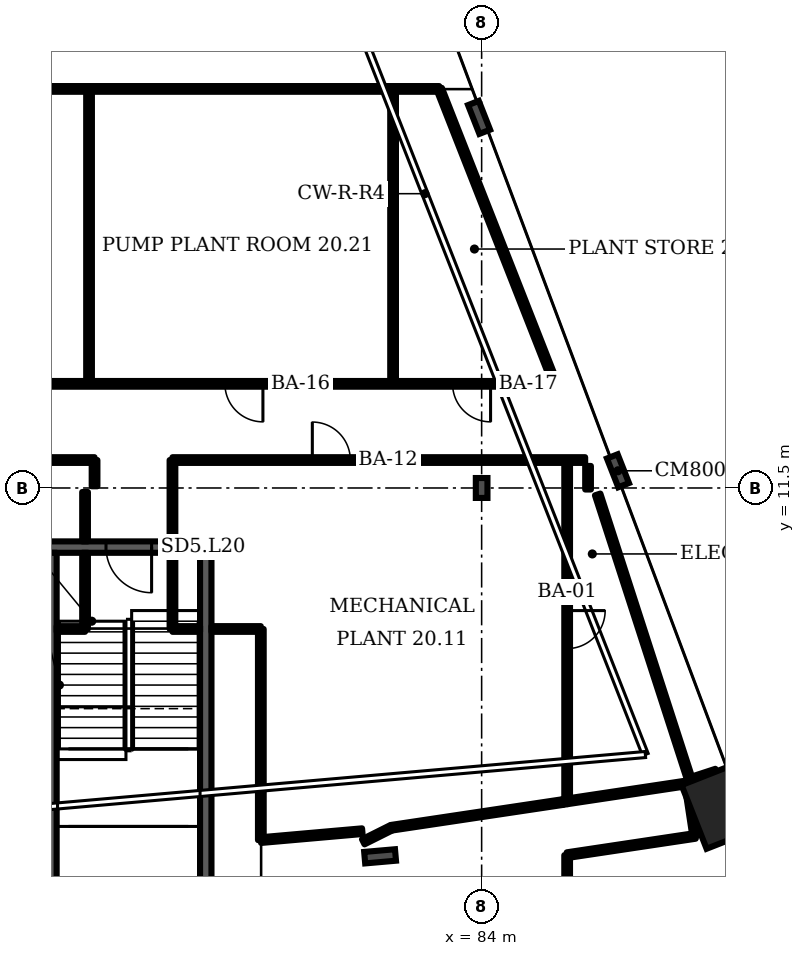
"""IFC4 building model, lengths in metres.
Left out: names, types, materials, properties, quantities, classifications, styles, units other than length and angle.
Written with IfcOpenShell. Run it as: python <this file> out.ifc"""

import sys

from ifc_helpers import new_model, si_unit, direction, frame, frame_2d, origin, origin_2d, place, context, subcontext, project, spatial, rectangle, i_section, extrude, element, fill, save


model = new_model("IFC4")
c1 = context("Model", 3, precision=1e-05, world=origin(), true_north=direction((0.0, 1.0)))
c2 = subcontext(c1, "Body", "Model", "MODEL_VIEW")
j1 = project(units=[si_unit("LENGTHUNIT", "METRE"), si_unit("PLANEANGLEUNIT", "RADIAN")], contexts=[c1])
p1 = place(None, origin())
s1 = spatial("IfcSite", under=j1, at=p1, CompositionType="ELEMENT")
p2 = place(p1, origin())
s2 = spatial("IfcBuilding", under=s1, at=p2, CompositionType="ELEMENT")
p3 = place(p2, frame((0.0, 0.0, 91.9)))
s3 = spatial("IfcBuildingStorey", under=s2, at=p3, CompositionType="ELEMENT", Elevation=91.9)
p4 = place(p3, frame((90.427, 3.174, 0.0), z_axis=(0.0, 0.0, 1.0), x_axis=(-0.365778, 0.930702, 0.0)))
e1 = element("IfcColumn", 1, at=p4, inside=s3, PredefinedType="COLUMN", context=c2, shape_type="SweptSolid", body=[
    extrude(rectangle(XDim=1.8, YDim=1.8, at=origin_2d()), origin(), (0.0, 0.0, 1.0), 4.8),
])
for number, where, z_axis, x_axis in (
    (2, (81.328, 1.808, 0.0), (0.0, 0.0, 1.0), (0.087, -0.996, 0.0)),
    (3, (87.587, 11.952, 0.0), (0.0, 0.0, 1.0), (0.931, 0.366, 0.0)),
    (4, (83.933, 21.251, 0.0), (0.0, 0.0, 1.0), (0.931, 0.366, 0.0)),
):
    element("IfcColumn", number, at=place(p3, frame(where, z_axis=z_axis, x_axis=x_axis)), inside=s3, PredefinedType="COLUMN", context=c2, shape_type="SweptSolid", body=[
        extrude(i_section(OverallWidth=0.303, OverallDepth=0.814, WebThickness=0.021, FlangeThickness=0.04, FilletRadius=0.03, at=origin_2d()), origin(), (0.0, 0.0, 1.0), 4.8),
    ])
p5 = place(p3, frame((84.0, 11.5, 0.0), z_axis=(0.0, 0.0, 1.0), x_axis=(1.0, 0.0, 0.0)))
e5 = element("IfcColumn", 5, at=p5, inside=s3, PredefinedType="COLUMN", context=c2, shape_type="SweptSolid", body=[
    extrude(i_section(OverallWidth=0.306, OverallDepth=0.524, WebThickness=0.021, FlangeThickness=0.04, FilletRadius=0.027, at=origin_2d()), origin(), (0.0, 0.0, 1.0), 4.8),
])
p6 = place(p3, frame((72.518, 9.945, 0.0), z_axis=(0.0, 0.0, 1.0), x_axis=(1.0, 0.0, 0.0)))
e6 = element("IfcWall", 6, at=p6, inside=s3, PredefinedType="SHEAR", context=c2, shape_type="SweptSolid", body=[
    extrude(rectangle(XDim=4.374, YDim=0.3, at=frame_2d((2.187, 0.0))), origin(), (0.0, 0.0, 1.0), 4.4),
])
p7 = place(p6, frame((1.598, 0.0, 0.0)))
e7 = element("IfcOpeningElement", 7, at=p7, cuts=e6, PredefinedType="OPENING", context=c2, shape_type="SweptSolid", body=[
    extrude(rectangle(XDim=1.2, YDim=2.1, at=frame_2d((0.6, 1.05))), frame((0.0, 0.16, 0.0), z_axis=(0.0, -1.0, 0.0), x_axis=(1.0, 0.0, 0.0)), (0.0, 0.0, 1.0), 0.32),
])
p8 = place(p3, frame((18.2, 14.24, 0.0), z_axis=(0.0, 0.0, 1.0), x_axis=(1.0, 0.0, 0.0)))
e8 = element("IfcWall", 8, at=p8, inside=s3, PredefinedType="PARTITIONING", context=c2, shape_type="SweptSolid", body=[
    extrude(rectangle(XDim=67.735, YDim=0.15, at=frame_2d((33.868, 0.0))), origin(), (0.0, 0.0, 1.0), 4.4),
])
p9 = place(p8, frame((11.98, 0.0, 0.0)))
e9 = element("IfcOpeningElement", 9, at=p9, cuts=e8, PredefinedType="OPENING", context=c2, shape_type="SweptSolid", body=[
    extrude(rectangle(XDim=1.0, YDim=2.1, at=frame_2d((0.5, 1.05))), frame((0.0, 0.085, 0.0), z_axis=(0.0, -1.0, 0.0), x_axis=(1.0, 0.0, 0.0)), (0.0, 0.0, 1.0), 0.17),
])
p10 = place(p8, frame((23.515, 0.0, 0.0)))
e10 = element("IfcOpeningElement", 10, at=p10, cuts=e8, PredefinedType="OPENING", context=c2, shape_type="SweptSolid", body=[
    extrude(rectangle(XDim=1.0, YDim=2.1, at=frame_2d((0.5, 1.05))), frame((0.0, 0.085, 0.0), z_axis=(0.0, -1.0, 0.0), x_axis=(1.0, 0.0, 0.0)), (0.0, 0.0, 1.0), 0.17),
])
p11 = place(p8, frame((59.045, 0.0, 0.0)))
e11 = element("IfcOpeningElement", 11, at=p11, cuts=e8, PredefinedType="OPENING", context=c2, shape_type="SweptSolid", body=[
    extrude(rectangle(XDim=1.0, YDim=2.1, at=frame_2d((0.5, 1.05))), frame((0.0, 0.085, 0.0), z_axis=(0.0, -1.0, 0.0), x_axis=(1.0, 0.0, 0.0)), (0.0, 0.0, 1.0), 0.17),
])
p12 = place(p8, frame((65.035, 0.0, 0.0)))
e12 = element("IfcOpeningElement", 12, at=p12, cuts=e8, PredefinedType="OPENING", context=c2, shape_type="SweptSolid", body=[
    extrude(rectangle(XDim=1.0, YDim=2.1, at=frame_2d((0.5, 1.05))), frame((0.0, 0.085, 0.0), z_axis=(0.0, -1.0, 0.0), x_axis=(1.0, 0.0, 0.0)), (0.0, 0.0, 1.0), 0.17),
])
p13 = place(p3, frame((44.51, 12.235, 0.0), z_axis=(0.0, 0.0, 1.0), x_axis=(1.0, 0.0, 0.0)))
e13 = element("IfcWall", 13, at=p13, inside=s3, PredefinedType="PARTITIONING", context=c2, shape_type="SweptSolid", body=[
    extrude(rectangle(XDim=29.305, YDim=0.15, at=frame_2d((14.652, 0.0))), origin(), (0.0, 0.0, 1.0), 4.4),
])
p14 = place(p13, frame((0.385, 0.0, 0.0)))
e14 = element("IfcOpeningElement", 14, at=p14, cuts=e13, PredefinedType="OPENING", context=c2, shape_type="SweptSolid", body=[
    extrude(rectangle(XDim=1.0, YDim=2.1, at=frame_2d((0.5, 1.05))), frame((0.0, 0.085, 0.0), z_axis=(0.0, -1.0, 0.0), x_axis=(1.0, 0.0, 0.0)), (0.0, 0.0, 1.0), 0.17),
])
p15 = place(p13, frame((9.513, 0.0, 0.0)))
e15 = element("IfcOpeningElement", 15, at=p15, cuts=e13, PredefinedType="OPENING", context=c2, shape_type="SweptSolid", body=[
    extrude(rectangle(XDim=1.0, YDim=2.1, at=frame_2d((0.5, 1.05))), frame((0.0, 0.085, 0.0), z_axis=(0.0, -1.0, 0.0), x_axis=(1.0, 0.0, 0.0)), (0.0, 0.0, 1.0), 0.17),
])
p16 = place(p13, frame((22.585, 0.0, 0.0)))
e16 = element("IfcOpeningElement", 16, at=p16, cuts=e13, PredefinedType="OPENING", context=c2, shape_type="SweptSolid", body=[
    extrude(rectangle(XDim=1.0, YDim=2.1, at=frame_2d((0.5, 1.05))), frame((0.0, 0.085, 0.0), z_axis=(0.0, -1.0, 0.0), x_axis=(1.0, 0.0, 0.0)), (0.0, 0.0, 1.0), 0.17),
])
p17 = place(p3, frame((72.125, 22.0, 0.0), z_axis=(0.0, 0.0, 1.0), x_axis=(1.0, 0.0, 0.0)))
e17 = element("IfcWall", 17, at=p17, inside=s3, PredefinedType="PARTITIONING", context=c2, shape_type="SweptSolid", body=[
    extrude(rectangle(XDim=10.76, YDim=0.15, at=frame_2d((5.38, 0.0))), origin(), (0.0, 0.0, 1.0), 4.4),
])
p18 = place(p3, frame((73.565, 7.79, 0.0), z_axis=(0.0, 0.0, 1.0), x_axis=(0.0, 1.0, 0.0)))
e18 = element("IfcWall", 18, at=p18, inside=s3, PredefinedType="PARTITIONING", context=c2, shape_type="SweptSolid", body=[
    extrude(rectangle(XDim=2.005, YDim=0.15, at=frame_2d((1.002, 0.0))), origin(), (0.0, 0.0, 1.0), 4.4),
])
p19 = place(p3, frame((73.67, 14.24, 0.0), z_axis=(0.0, 0.0, 1.0), x_axis=(0.0, 1.0, 0.0)))
e19 = element("IfcWall", 19, at=p19, inside=s3, PredefinedType="PARTITIONING", context=c2, shape_type="SweptSolid", body=[
    extrude(rectangle(XDim=7.76, YDim=0.15, at=frame_2d((3.88, 0.0))), origin(), (0.0, 0.0, 1.0), 4.4),
])
p20 = place(p3, frame((73.815, 11.545, 0.0), z_axis=(0.0, 0.0, 1.0), x_axis=(0.0, 1.0, 0.0)))
e20 = element("IfcWall", 20, at=p20, inside=s3, PredefinedType="PARTITIONING", context=c2, shape_type="SweptSolid", body=[
    extrude(rectangle(XDim=0.69, YDim=0.15, at=frame_2d((0.345, 0.0))), origin(), (0.0, 0.0, 1.0), 4.4),
])
p21 = place(p3, frame((75.865, 7.79, 0.0), z_axis=(0.0, 0.0, 1.0), x_axis=(0.0, 1.0, 0.0)))
e21 = element("IfcWall", 21, at=p21, inside=s3, PredefinedType="PARTITIONING", context=c2, shape_type="SweptSolid", body=[
    extrude(rectangle(XDim=2.005, YDim=0.15, at=frame_2d((1.002, 0.0))), origin(), (0.0, 0.0, 1.0), 4.4),
])
p22 = place(p3, frame((75.865, 7.79, 0.0), z_axis=(0.0, 0.0, 1.0), x_axis=(1.0, 0.0, 0.0)))
e22 = element("IfcWall", 22, at=p22, inside=s3, PredefinedType="PARTITIONING", context=c2, shape_type="SweptSolid", body=[
    extrude(rectangle(XDim=0.726, YDim=0.15, at=frame_2d((0.363, 0.0))), origin(), (0.0, 0.0, 1.0), 4.4),
])
p23 = place(p3, frame((75.865, 12.235, 0.0), z_axis=(0.0, 0.0, 1.0), x_axis=(1.0, 0.0, 0.0)))
e23 = element("IfcWall", 23, at=p23, inside=s3, PredefinedType="PARTITIONING", context=c2, shape_type="SweptSolid", body=[
    extrude(rectangle(XDim=10.859, YDim=0.15, at=frame_2d((5.429, 0.0))), origin(), (0.0, 0.0, 1.0), 4.4),
])
p24 = place(p23, frame((3.68, 0.0, 0.0)))
e24 = element("IfcOpeningElement", 24, at=p24, cuts=e23, PredefinedType="OPENING", context=c2, shape_type="SweptSolid", body=[
    extrude(rectangle(XDim=1.0, YDim=2.1, at=frame_2d((0.5, 1.05))), frame((0.0, 0.085, 0.0), z_axis=(0.0, -1.0, 0.0), x_axis=(1.0, 0.0, 0.0)), (0.0, 0.0, 1.0), 0.17),
])
p25 = place(p3, frame((78.19, 2.235, 0.0), z_axis=(0.0, 0.0, 1.0), x_axis=(0.996154, 0.08762, 0.0)))
e25 = element("IfcWall", 25, at=p25, inside=s3, PredefinedType="PARTITIONING", context=c2, shape_type="SweptSolid", body=[
    extrude(rectangle(XDim=2.68, YDim=0.15, at=frame_2d((1.34, 0.0))), origin(), (0.0, 0.0, 1.0), 4.4),
])
p26 = place(p3, frame((78.19, 2.235, 0.0), z_axis=(0.0, 0.0, 1.0), x_axis=(0.0, 1.0, 0.0)))
e26 = element("IfcWall", 26, at=p26, inside=s3, PredefinedType="PARTITIONING", context=c2, shape_type="SweptSolid", body=[
    extrude(rectangle(XDim=5.555, YDim=0.15, at=frame_2d((2.777, 0.0))), origin(), (0.0, 0.0, 1.0), 4.4),
])
p27 = place(p3, frame((80.885, 2.19, 0.0), z_axis=(0.0, 0.0, 1.0), x_axis=(0.894365, 0.44733, 0.0)))
e27 = element("IfcWall", 27, at=p27, inside=s3, PredefinedType="PARTITIONING", context=c2, shape_type="SweptSolid", body=[
    extrude(rectangle(XDim=0.827, YDim=0.15, at=frame_2d((0.414, 0.0))), origin(), (0.0, 0.0, 1.0), 4.4),
])
p28 = place(p3, frame((81.625, 2.56, 0.0), z_axis=(0.0, 0.0, 1.0), x_axis=(0.988954, 0.148193, 0.0)))
e28 = element("IfcWall", 28, at=p28, inside=s3, PredefinedType="PARTITIONING", context=c2, shape_type="SweptSolid", body=[
    extrude(rectangle(XDim=4.555, YDim=0.15, at=frame_2d((2.278, 0.0))), origin(), (0.0, 0.0, 1.0), 4.4),
])
p29 = place(p3, frame((81.67, 14.24, 0.0), z_axis=(0.0, 0.0, 1.0), x_axis=(0.0, 1.0, 0.0)))
e29 = element("IfcWall", 29, at=p29, inside=s3, PredefinedType="PARTITIONING", context=c2, shape_type="SweptSolid", body=[
    extrude(rectangle(XDim=7.76, YDim=0.15, at=frame_2d((3.88, 0.0))), origin(), (0.0, 0.0, 1.0), 4.4),
])
p30 = place(p3, frame((85.935, 14.24, 0.0), z_axis=(0.0, 0.0, 1.0), x_axis=(-0.365805, 0.93069, 0.0)))
e30 = element("IfcWall", 30, at=p30, inside=s3, PredefinedType="PARTITIONING", context=c2, shape_type="SweptSolid", body=[
    extrude(rectangle(XDim=8.338, YDim=0.15, at=frame_2d((4.169, 0.0))), origin(), (0.0, 0.0, 1.0), 4.4),
])
p31 = place(p3, frame((86.13, 3.235, 0.0), z_axis=(0.0, 0.0, 1.0), x_axis=(0.986715, 0.162447, 0.0)))
e31 = element("IfcWall", 31, at=p31, inside=s3, PredefinedType="PARTITIONING", context=c2, shape_type="SweptSolid", body=[
    extrude(rectangle(XDim=0.122, YDim=0.15, at=frame_2d((0.061, 0.0))), origin(), (0.0, 0.0, 1.0), 4.4),
])
p32 = place(p3, frame((86.25, 1.839, 0.0), z_axis=(0.0, 0.0, 1.0), x_axis=(0.988924, 0.148403, 0.0)))
e32 = element("IfcWall", 32, at=p32, inside=s3, PredefinedType="PARTITIONING", context=c2, shape_type="SweptSolid", body=[
    extrude(rectangle(XDim=3.41, YDim=0.15, at=frame_2d((1.705, 0.0))), origin(), (0.0, 0.0, 1.0), 4.4),
])
p33 = place(p3, frame((86.25, -0.483, 0.0), z_axis=(0.0, 0.0, 1.0), x_axis=(0.0, 1.0, 0.0)))
e33 = element("IfcWall", 33, at=p33, inside=s3, PredefinedType="PARTITIONING", context=c2, shape_type="SweptSolid", body=[
    extrude(rectangle(XDim=2.322, YDim=0.15, at=frame_2d((1.161, 0.0))), origin(), (0.0, 0.0, 1.0), 4.4),
])
p34 = place(p3, frame((86.25, 3.255, 0.0), z_axis=(0.0, 0.0, 1.0), x_axis=(0.0, 1.0, 0.0)))
e34 = element("IfcWall", 34, at=p34, inside=s3, PredefinedType="PARTITIONING", context=c2, shape_type="SweptSolid", body=[
    extrude(rectangle(XDim=8.98, YDim=0.15, at=frame_2d((4.49, 0.0))), origin(), (0.0, 0.0, 1.0), 4.4),
])
p35 = place(p34, frame((4.019, 0.0, 0.0)))
e35 = element("IfcOpeningElement", 35, at=p35, cuts=e34, PredefinedType="OPENING", context=c2, shape_type="SweptSolid", body=[
    extrude(rectangle(XDim=1.0, YDim=2.1, at=frame_2d((0.5, 1.05))), frame((0.0, 0.085, 0.0), z_axis=(0.0, -1.0, 0.0), x_axis=(1.0, 0.0, 0.0)), (0.0, 0.0, 1.0), 0.17),
])
p36 = place(p3, frame((86.25, 3.255, 0.0), z_axis=(0.0, 0.0, 1.0), x_axis=(0.988889, 0.148681, 0.0)))
e36 = element("IfcWall", 36, at=p36, inside=s3, PredefinedType="PARTITIONING", context=c2, shape_type="SweptSolid", body=[
    extrude(rectangle(XDim=3.195, YDim=0.15, at=frame_2d((1.598, 0.0))), origin(), (0.0, 0.0, 1.0), 4.4),
])
p37 = place(p3, frame((86.8, 11.46, 0.0), z_axis=(0.0, 0.0, 1.0), x_axis=(0.0, 1.0, 0.0)))
e37 = element("IfcWall", 37, at=p37, inside=s3, PredefinedType="PARTITIONING", context=c2, shape_type="SweptSolid", body=[
    extrude(rectangle(XDim=0.62, YDim=0.15, at=frame_2d((0.31, 0.0))), origin(), (0.0, 0.0, 1.0), 4.4),
])
p38 = place(p3, frame((89.484, 3.816, 0.0), z_axis=(0.0, 0.0, 1.0), x_axis=(-0.307849, 0.951432, 0.0)))
e38 = element("IfcWall", 38, at=p38, inside=s3, PredefinedType="PARTITIONING", context=c2, shape_type="SweptSolid", body=[
    extrude(rectangle(XDim=7.897, YDim=0.15, at=frame_2d((3.949, 0.0))), origin(), (0.0, 0.0, 1.0), 4.4),
])
p39 = place(p3, frame((89.485, 3.815, 0.0), z_axis=(0.0, 0.0, 1.0), x_axis=(0.950589, 0.310465, 0.0)))
e39 = element("IfcWall", 39, at=p39, inside=s3, PredefinedType="PARTITIONING", context=c2, shape_type="SweptSolid", body=[
    extrude(rectangle(XDim=0.725, YDim=0.15, at=frame_2d((0.363, 0.0))), origin(), (0.0, 0.0, 1.0), 4.4),
])
p40 = place(p3, frame((89.62, 2.345, 0.0), z_axis=(0.0, 0.0, 1.0), x_axis=(-0.149996, 0.988691, 0.0)))
e40 = element("IfcWall", 40, at=p40, inside=s3, PredefinedType="PARTITIONING", context=c2, shape_type="SweptSolid", body=[
    extrude(rectangle(XDim=1.371, YDim=0.15, at=frame_2d((0.685, 0.0))), origin(), (0.0, 0.0, 1.0), 4.4),
])
p41 = place(p3, frame((72.817, 7.79, 0.0), z_axis=(0.0, 0.0, 1.0), x_axis=(1.0, 0.0, 0.0)))
e41 = element("IfcWall", 41, at=p41, inside=s3, PredefinedType="PARTITIONING", context=c2, shape_type="SweptSolid", body=[
    extrude(rectangle(XDim=0.748, YDim=0.15, at=frame_2d((0.374, 0.0))), origin(), (0.0, 0.0, 1.0), 4.4),
])
p42 = place(p3, frame((73.565, 10.095, 0.0), z_axis=(0.0, 0.0, 1.0), x_axis=(0.0, 1.0, 0.0)))
e42 = element("IfcWall", 42, at=p42, inside=s3, PredefinedType="PARTITIONING", context=c2, shape_type="SweptSolid", body=[
    extrude(rectangle(XDim=1.3, YDim=0.15, at=frame_2d((0.65, 0.0))), origin(), (0.0, 0.0, 1.0), 4.4),
])
p43 = place(p3, frame((75.865, 10.095, 0.0), z_axis=(0.0, 0.0, 1.0), x_axis=(0.0, 1.0, 0.0)))
e43 = element("IfcWall", 43, at=p43, inside=s3, PredefinedType="PARTITIONING", context=c2, shape_type="SweptSolid", body=[
    extrude(rectangle(XDim=2.14, YDim=0.15, at=frame_2d((1.07, 0.0))), origin(), (0.0, 0.0, 1.0), 4.4),
])
p44 = place(p3, frame((76.891, 7.79, 0.0), z_axis=(0.0, 0.0, 1.0), x_axis=(1.0, 0.0, 0.0)))
e44 = element("IfcWall", 44, at=p44, inside=s3, PredefinedType="PARTITIONING", context=c2, shape_type="SweptSolid", body=[
    extrude(rectangle(XDim=1.299, YDim=0.15, at=frame_2d((0.649, 0.0))), origin(), (0.0, 0.0, 1.0), 4.4),
])
for number, where, z_axis, x_axis in (
    (45, (72.667, -0.008, 0.0), (0.0, 0.0, 1.0), (0.0, 1.0, 0.0)),
    (46, (76.741, -0.008, 0.0), (0.0, 0.0, 1.0), (0.0, 1.0, 0.0)),
):
    element("IfcWall", number, at=place(p3, frame(where, z_axis=z_axis, x_axis=x_axis)), inside=s3, PredefinedType="SHEAR", context=c2, shape_type="SweptSolid", body=[
        extrude(rectangle(XDim=9.803, YDim=0.3, at=frame_2d((4.901, 0.0))), origin(), (0.0, 0.0, 1.0), 4.4),
    ])
p45 = place(p7, origin())
e47 = element("IfcDoor", 47, at=p45, inside=s3, OperationType="SINGLE_SWING_RIGHT", PredefinedType="DOOR", context=c2, shape_type="SweptSolid", body=[
    extrude(rectangle(XDim=1.2, YDim=2.1, at=frame_2d((0.6, 1.05))), frame((0.0, 0.025, 0.0), z_axis=(0.0, -1.0, 0.0), x_axis=(1.0, 0.0, 0.0)), (0.0, 0.0, 1.0), 0.05),
])
fill(e7, e47)
p46 = place(p35, origin())
e48 = element("IfcDoor", 48, at=p46, inside=s3, OperationType="SINGLE_SWING_RIGHT", PredefinedType="DOOR", context=c2, shape_type="SweptSolid", body=[
    extrude(rectangle(XDim=1.0, YDim=2.1, at=frame_2d((0.5, 1.05))), frame((0.0, 0.025, 0.0), z_axis=(0.0, -1.0, 0.0), x_axis=(1.0, 0.0, 0.0)), (0.0, 0.0, 1.0), 0.05),
])
fill(e35, e48)
p47 = place(p24, origin())
e49 = element("IfcDoor", 49, at=p47, inside=s3, OperationType="SINGLE_SWING_LEFT", PredefinedType="DOOR", context=c2, shape_type="SweptSolid", body=[
    extrude(rectangle(XDim=1.0, YDim=2.1, at=frame_2d((0.5, 1.05))), frame((0.0, 0.025, 0.0), z_axis=(0.0, -1.0, 0.0), x_axis=(1.0, 0.0, 0.0)), (0.0, 0.0, 1.0), 0.05),
])
fill(e24, e49)
p48 = place(p11, origin())
e50 = element("IfcDoor", 50, at=p48, inside=s3, OperationType="SINGLE_SWING_RIGHT", PredefinedType="DOOR", context=c2, shape_type="SweptSolid", body=[
    extrude(rectangle(XDim=1.0, YDim=2.1, at=frame_2d((0.5, 1.05))), frame((0.0, 0.025, 0.0), z_axis=(0.0, -1.0, 0.0), x_axis=(1.0, 0.0, 0.0)), (0.0, 0.0, 1.0), 0.05),
])
fill(e11, e50)
p49 = place(p12, origin())
e51 = element("IfcDoor", 51, at=p49, inside=s3, OperationType="SINGLE_SWING_RIGHT", PredefinedType="DOOR", context=c2, shape_type="SweptSolid", body=[
    extrude(rectangle(XDim=1.0, YDim=2.1, at=frame_2d((0.5, 1.05))), frame((0.0, 0.025, 0.0), z_axis=(0.0, -1.0, 0.0), x_axis=(1.0, 0.0, 0.0)), (0.0, 0.0, 1.0), 0.05),
])
fill(e12, e51)
save(model, sys.argv[1])
